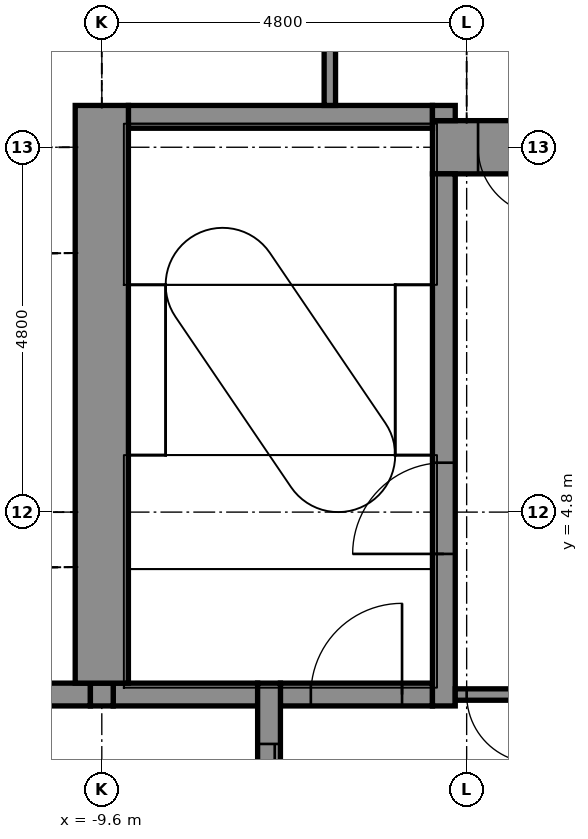
"""IFC4 building model, lengths in metres.
Left out: names, types, materials, properties, quantities, classifications, styles, units other than length and angle.
Written with IfcOpenShell. Run it as: python <this file> out.ifc"""

import sys

from ifc_helpers import new_model, si_unit, direction, frame, frame_2d, origin, place, context, subcontext, project, spatial, rectangle, extrude, element, fill, save


model = new_model("IFC4")
c1 = context("Model", 3, precision=1e-05, world=origin(), true_north=direction((0.0, 1.0)))
c2 = subcontext(c1, "Body", "Model", "MODEL_VIEW")
j1 = project(units=[si_unit("LENGTHUNIT", "METRE"), si_unit("PLANEANGLEUNIT", "RADIAN")], contexts=[c1])
p1 = place(None, origin())
s1 = spatial("IfcSite", under=j1, at=p1, CompositionType="ELEMENT")
p2 = place(p1, origin())
s2 = spatial("IfcBuilding", under=s1, at=p2, CompositionType="ELEMENT")
p3 = place(p2, frame((0.0, 0.0, 216.8)))
s3 = spatial("IfcBuildingStorey", under=s2, at=p3, CompositionType="ELEMENT", Elevation=216.8)
p4 = place(p3, frame((-10.85, 2.4, -0.3), z_axis=(0.0, 0.0, 1.0), x_axis=(1.0, 0.0, 0.0)))
e1 = element("IfcWall", 1, at=p4, inside=s3, PredefinedType="STANDARD", context=c2, shape_type="SweptSolid", body=[
    extrude(rectangle(XDim=1.1, YDim=0.3, at=frame_2d((0.55, 0.0))), origin(), (0.0, 0.0, 1.0), 6.15),
])
p5 = place(p3, frame((-9.45, 2.4, -0.3), z_axis=(0.0, 0.0, 1.0), x_axis=(1.0, 0.0, 0.0)))
e2 = element("IfcWall", 2, at=p5, inside=s3, PredefinedType="STANDARD", context=c2, shape_type="SweptSolid", body=[
    extrude(rectangle(XDim=1.9, YDim=0.3, at=frame_2d((0.95, 0.0))), origin(), (0.0, 0.0, 1.0), 6.15),
])
p6 = place(p3, frame((-7.25, 2.4, -0.3), z_axis=(0.0, 0.0, 1.0), x_axis=(1.0, 0.0, 0.0)))
e3 = element("IfcWall", 3, at=p6, inside=s3, PredefinedType="STANDARD", context=c2, shape_type="SweptSolid", body=[
    extrude(rectangle(XDim=2.0, YDim=0.3, at=frame_2d((1.0, 0.0))), origin(), (0.0, 0.0, 1.0), 6.15),
])
p7 = place(p6, frame((0.4, 0.0, 0.3)))
e4 = element("IfcOpeningElement", 4, at=p7, cuts=e3, PredefinedType="OPENING", context=c2, shape_type="SweptSolid", body=[
    extrude(rectangle(XDim=1.2, YDim=2.1, at=frame_2d((0.6, 1.05))), frame((0.0, 0.16, 0.0), z_axis=(0.0, -1.0, 0.0), x_axis=(1.0, 0.0, 0.0)), (0.0, 0.0, 1.0), 0.32),
])
p8 = place(p3, frame((-5.25, 9.6, -0.3), z_axis=(0.0, 0.0, 1.0), x_axis=(1.0, 0.0, 0.0)))
e5 = element("IfcWall", 5, at=p8, inside=s3, PredefinedType="SHEAR", context=c2, shape_type="SweptSolid", body=[
    extrude(rectangle(XDim=14.5, YDim=0.7, at=frame_2d((7.25, 0.0))), origin(), (0.0, 0.0, 1.0), 6.15),
])
p9 = place(p8, frame((0.6, 0.0, 0.3)))
e6 = element("IfcOpeningElement", 6, at=p9, cuts=e5, PredefinedType="OPENING", context=c2, shape_type="SweptSolid", body=[
    extrude(rectangle(XDim=0.9, YDim=2.1, at=frame_2d((0.45, 1.05))), frame((0.0, 0.36, 0.0), z_axis=(0.0, -1.0, 0.0), x_axis=(1.0, 0.0, 0.0)), (0.0, 0.0, 1.0), 0.72),
])
p10 = place(p3, frame((-9.25, 10.0, -0.3), z_axis=(0.0, 0.0, 1.0), x_axis=(1.0, 0.0, 0.0)))
e7 = element("IfcWall", 7, at=p10, inside=s3, PredefinedType="STANDARD", context=c2, shape_type="SweptSolid", body=[
    extrude(rectangle(XDim=4.0, YDim=0.3, at=frame_2d((2.0, 0.0))), origin(), (0.0, 0.0, 1.0), 6.15),
])
p11 = place(p3, frame((-9.6, 2.25, -0.3), z_axis=(0.0, 0.0, 1.0), x_axis=(0.0, 1.0, 0.0)))
e8 = element("IfcWall", 8, at=p11, inside=s3, PredefinedType="STANDARD", context=c2, shape_type="SweptSolid", body=[
    extrude(rectangle(XDim=0.3, YDim=0.3, at=frame_2d((0.15, 0.0))), origin(), (0.0, 0.0, 1.0), 6.15),
])
p12 = place(p3, frame((-9.6, 2.55, -0.3), z_axis=(0.0, 0.0, 1.0), x_axis=(0.0, 1.0, 0.0)))
e9 = element("IfcWall", 9, at=p12, inside=s3, PredefinedType="SHEAR", context=c2, shape_type="SweptSolid", body=[
    extrude(rectangle(XDim=7.6, YDim=0.7, at=frame_2d((3.8, 0.0))), origin(), (0.0, 0.0, 1.0), 6.15),
])
p13 = place(p3, frame((-7.4, -2.55, -0.3), z_axis=(0.0, 0.0, 1.0), x_axis=(0.0, 1.0, 0.0)))
e10 = element("IfcWall", 10, at=p13, inside=s3, PredefinedType="STANDARD", context=c2, shape_type="SweptSolid", body=[
    extrude(rectangle(XDim=5.1, YDim=0.3, at=frame_2d((2.55, 0.0))), origin(), (0.0, 0.0, 1.0), 6.15),
])
p14 = place(p13, frame((0.8, 0.0, 0.3)))
e11 = element("IfcOpeningElement", 11, at=p14, cuts=e10, PredefinedType="OPENING", context=c2, shape_type="SweptSolid", body=[
    extrude(rectangle(XDim=1.1, YDim=2.1, at=frame_2d((0.55, 1.05))), frame((0.0, 0.16, 0.0), z_axis=(0.0, -1.0, 0.0), x_axis=(1.0, 0.0, 0.0)), (0.0, 0.0, 1.0), 0.32),
])
p15 = place(p13, frame((3.2, 0.0, 0.3)))
e12 = element("IfcOpeningElement", 12, at=p15, cuts=e10, PredefinedType="OPENING", context=c2, shape_type="SweptSolid", body=[
    extrude(rectangle(XDim=1.1, YDim=2.1, at=frame_2d((0.55, 1.05))), frame((0.0, 0.16, 0.0), z_axis=(0.0, -1.0, 0.0), x_axis=(1.0, 0.0, 0.0)), (0.0, 0.0, 1.0), 0.32),
])
p16 = place(p3, frame((-5.1, 2.25, -0.3), z_axis=(0.0, 0.0, 1.0), x_axis=(0.0, 1.0, 0.0)))
e13 = element("IfcWall", 13, at=p16, inside=s3, PredefinedType="STANDARD", context=c2, shape_type="SweptSolid", body=[
    extrude(rectangle(XDim=7.0, YDim=0.3, at=frame_2d((3.5, 0.0))), origin(), (0.0, 0.0, 1.0), 6.15),
])
p17 = place(p16, frame((2.0, 0.0, 0.3)))
e14 = element("IfcOpeningElement", 14, at=p17, cuts=e13, PredefinedType="OPENING", context=c2, shape_type="SweptSolid", body=[
    extrude(rectangle(XDim=1.2, YDim=2.1, at=frame_2d((0.6, 1.05))), frame((0.0, 0.16, 0.0), z_axis=(0.0, -1.0, 0.0), x_axis=(1.0, 0.0, 0.0)), (0.0, 0.0, 1.0), 0.32),
])
p18 = place(p3, frame((-5.1, 9.95, -0.3), z_axis=(0.0, 0.0, 1.0), x_axis=(0.0, 1.0, 0.0)))
e15 = element("IfcWall", 15, at=p18, inside=s3, PredefinedType="STANDARD", context=c2, shape_type="SweptSolid", body=[
    extrude(rectangle(XDim=0.2, YDim=0.3, at=frame_2d((0.1, 0.0))), origin(), (0.0, 0.0, 1.0), 6.15),
])
p19 = place(p3, frame((-6.6, 10.15, 0.0), z_axis=(0.0, 0.0, 1.0), x_axis=(0.0, 1.0, 0.0)))
e16 = element("IfcWall", 16, at=p19, inside=s3, PredefinedType="PARTITIONING", context=c2, shape_type="SweptSolid", body=[
    extrude(rectangle(XDim=4.65, YDim=0.15, at=frame_2d((2.325, 0.0))), origin(), (0.0, 0.0, 1.0), 5.85),
])
p20 = place(p19, frame((1.8, 0.0, 0.0)))
e17 = element("IfcOpeningElement", 17, at=p20, cuts=e16, PredefinedType="OPENING", context=c2, shape_type="SweptSolid", body=[
    extrude(rectangle(XDim=0.9, YDim=2.1, at=frame_2d((0.45, 1.05))), frame((0.0, 0.085, 0.0), z_axis=(0.0, -1.0, 0.0), x_axis=(1.0, 0.0, 0.0)), (0.0, 0.0, 1.0), 0.17),
])
p21 = place(p3, frame((-4.95, 2.4, 0.0), z_axis=(0.0, 0.0, 1.0), x_axis=(1.0, 0.0, 0.0)))
e18 = element("IfcWall", 18, at=p21, inside=s3, PredefinedType="PARTITIONING", context=c2, shape_type="SweptSolid", body=[
    extrude(rectangle(XDim=1.2, YDim=0.15, at=frame_2d((0.6, 0.0))), origin(), (0.0, 0.0, 1.0), 5.85),
])
p22 = place(p21, frame((0.15, 0.0, 0.0)))
e19 = element("IfcOpeningElement", 19, at=p22, cuts=e18, PredefinedType="OPENING", context=c2, shape_type="SweptSolid", body=[
    extrude(rectangle(XDim=0.9, YDim=2.1, at=frame_2d((0.45, 1.05))), frame((0.0, 0.085, 0.0), z_axis=(0.0, -1.0, 0.0), x_axis=(1.0, 0.0, 0.0)), (0.0, 0.0, 1.0), 0.17),
])
p23 = place(p15, origin())
e20 = element("IfcDoor", 20, at=p23, inside=s3, OperationType="DOUBLE_DOOR_SLIDING", PredefinedType="DOOR", context=c2, shape_type="SweptSolid", body=[
    extrude(rectangle(XDim=1.1, YDim=2.1, at=frame_2d((0.55, 1.05))), frame((0.0, 0.025, 0.0), z_axis=(0.0, -1.0, 0.0), x_axis=(1.0, 0.0, 0.0)), (0.0, 0.0, 1.0), 0.05),
])
fill(e12, e20)
p24 = place(p17, origin())
e21 = element("IfcDoor", 21, at=p24, inside=s3, OperationType="SINGLE_SWING_LEFT", PredefinedType="DOOR", context=c2, shape_type="SweptSolid", body=[
    extrude(rectangle(XDim=1.2, YDim=2.1, at=frame_2d((0.6, 1.05))), frame((0.0, 0.025, 0.0), z_axis=(0.0, -1.0, 0.0), x_axis=(1.0, 0.0, 0.0)), (0.0, 0.0, 1.0), 0.05),
])
fill(e14, e21)
p25 = place(p9, frame((0.9, 0.0, 0.0), z_axis=(0.0, 0.0, 1.0), x_axis=(-1.0, 0.0, 0.0)))
e22 = element("IfcDoor", 22, at=p25, inside=s3, OperationType="SINGLE_SWING_RIGHT", PredefinedType="DOOR", context=c2, shape_type="SweptSolid", body=[
    extrude(rectangle(XDim=0.9, YDim=2.1, at=frame_2d((0.45, 1.05))), frame((0.0, 0.025, 0.0), z_axis=(0.0, -1.0, 0.0), x_axis=(1.0, 0.0, 0.0)), (0.0, 0.0, 1.0), 0.05),
])
fill(e6, e22)
p26 = place(p22, frame((0.9, 0.0, 0.0), z_axis=(0.0, 0.0, 1.0), x_axis=(-1.0, 0.0, 0.0)))
e23 = element("IfcDoor", 23, at=p26, inside=s3, OperationType="SINGLE_SWING_RIGHT", PredefinedType="DOOR", context=c2, shape_type="SweptSolid", body=[
    extrude(rectangle(XDim=0.9, YDim=2.1, at=frame_2d((0.45, 1.05))), frame((0.0, 0.025, 0.0), z_axis=(0.0, -1.0, 0.0), x_axis=(1.0, 0.0, 0.0)), (0.0, 0.0, 1.0), 0.05),
])
fill(e19, e23)
p27 = place(p7, origin())
e24 = element("IfcDoor", 24, at=p27, inside=s3, OperationType="SINGLE_SWING_RIGHT", PredefinedType="DOOR", context=c2, shape_type="SweptSolid", body=[
    extrude(rectangle(XDim=1.2, YDim=2.1, at=frame_2d((0.6, 1.05))), frame((0.0, 0.025, 0.0), z_axis=(0.0, -1.0, 0.0), x_axis=(1.0, 0.0, 0.0)), (0.0, 0.0, 1.0), 0.05),
])
fill(e4, e24)
save(model, sys.argv[1])
